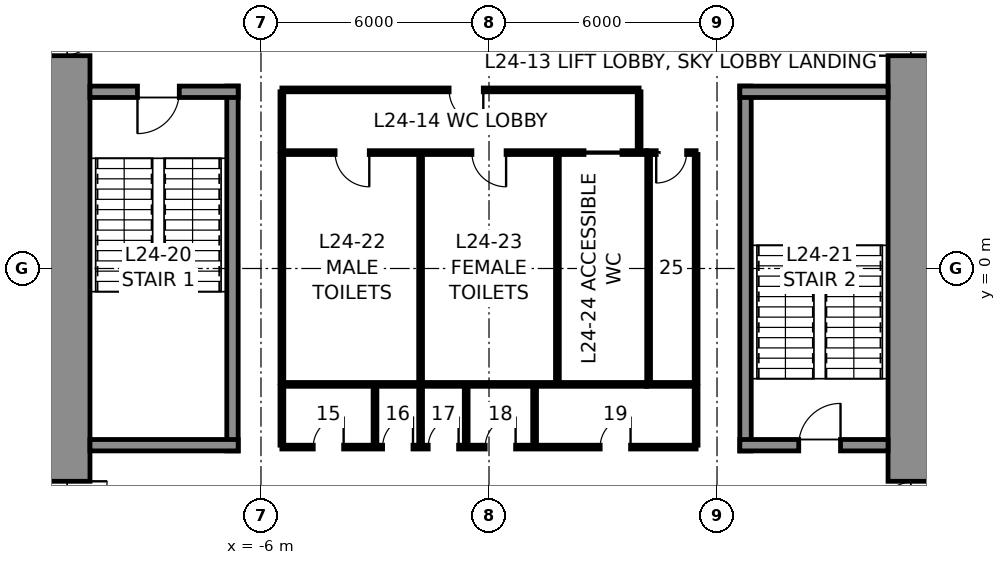
"""IFC4 building model, lengths in metres.
Left out: names, types, materials, properties, quantities, classifications, styles, units other than length and angle.
Written with IfcOpenShell. Run it as: python <this file> out.ifc"""

import sys

from ifc_helpers import new_model, si_unit, direction, frame, frame_2d, origin, place, context, subcontext, project, spatial, rectangle, extrude, element, fill, save


model = new_model("IFC4")
c1 = context("Model", 3, precision=1e-05, world=origin(), true_north=direction((0.0, 1.0)))
c2 = subcontext(c1, "Body", "Model", "MODEL_VIEW")
j1 = project(units=[si_unit("LENGTHUNIT", "METRE"), si_unit("PLANEANGLEUNIT", "RADIAN")], contexts=[c1])
p1 = place(None, origin())
s1 = spatial("IfcSite", under=j1, at=p1, CompositionType="ELEMENT")
p2 = place(p1, origin())
s2 = spatial("IfcBuilding", under=s1, at=p2, CompositionType="ELEMENT")
p3 = place(p2, frame((0.0, 0.0, 122.8)))
s3 = spatial("IfcBuildingStorey", under=s2, at=p3, CompositionType="ELEMENT", Elevation=122.8)
p4 = place(p3, frame((11.25, 10.5, 0.0), z_axis=(0.0, 0.0, 1.0), x_axis=(0.0, -1.0, 0.0)))
e1 = element("IfcWall", 1, at=p4, inside=s3, PredefinedType="SHEAR", context=c2, shape_type="SweptSolid", body=[
    extrude(rectangle(XDim=21.0, YDim=1.5, at=frame_2d((10.5, 0.0))), origin(), (0.0, 0.0, 1.0), 5.0),
])
p5 = place(p4, frame((3.7, 0.0, 0.0)))
e2 = element("IfcOpeningElement", 2, at=p5, cuts=e1, PredefinedType="OPENING", context=c2, shape_type="SweptSolid", body=[
    extrude(rectangle(XDim=1.2, YDim=2.3, at=frame_2d((0.6, 1.15))), frame((0.0, 0.76, 0.0), z_axis=(0.0, -1.0, 0.0), x_axis=(1.0, 0.0, 0.0)), (0.0, 0.0, 1.0), 1.52),
])
p6 = place(p4, frame((16.1, 0.0, 0.0)))
e3 = element("IfcOpeningElement", 3, at=p6, cuts=e1, PredefinedType="OPENING", context=c2, shape_type="SweptSolid", body=[
    extrude(rectangle(XDim=1.2, YDim=2.3, at=frame_2d((0.6, 1.15))), frame((0.0, 0.76, 0.0), z_axis=(0.0, -1.0, 0.0), x_axis=(1.0, 0.0, 0.0)), (0.0, 0.0, 1.0), 1.52),
])
p7 = place(p3, frame((-11.25, -10.5, 0.0), z_axis=(0.0, 0.0, 1.0), x_axis=(0.0, 1.0, 0.0)))
e4 = element("IfcWall", 4, at=p7, inside=s3, PredefinedType="SHEAR", context=c2, shape_type="SweptSolid", body=[
    extrude(rectangle(XDim=21.0, YDim=1.5, at=frame_2d((10.5, 0.0))), origin(), (0.0, 0.0, 1.0), 5.0),
])
p8 = place(p7, frame((16.1, 0.0, 0.0)))
e5 = element("IfcOpeningElement", 5, at=p8, cuts=e4, PredefinedType="OPENING", context=c2, shape_type="SweptSolid", body=[
    extrude(rectangle(XDim=1.2, YDim=2.3, at=frame_2d((0.6, 1.15))), frame((0.0, 0.76, 0.0), z_axis=(0.0, -1.0, 0.0), x_axis=(1.0, 0.0, 0.0)), (0.0, 0.0, 1.0), 1.52),
])
p9 = place(p7, frame((3.7, 0.0, 0.0)))
e6 = element("IfcOpeningElement", 6, at=p9, cuts=e4, PredefinedType="OPENING", context=c2, shape_type="SweptSolid", body=[
    extrude(rectangle(XDim=1.2, YDim=2.3, at=frame_2d((0.6, 1.15))), frame((0.0, 0.76, 0.0), z_axis=(0.0, -1.0, 0.0), x_axis=(1.0, 0.0, 0.0)), (0.0, 0.0, 1.0), 1.52),
])
p10 = place(p3, frame((-6.75, -4.8, 0.0), z_axis=(0.0, 0.0, 1.0), x_axis=(0.0, 1.0, 0.0)))
e7 = element("IfcWall", 7, at=p10, inside=s3, PredefinedType="SOLIDWALL", context=c2, shape_type="SweptSolid", body=[
    extrude(rectangle(XDim=9.6, YDim=0.3, at=frame_2d((4.8, 0.0))), origin(), (0.0, 0.0, 1.0), 4.75),
])
p11 = place(p3, frame((-10.5, 4.65, 0.0), z_axis=(0.0, 0.0, 1.0), x_axis=(1.0, 0.0, 0.0)))
e8 = element("IfcWall", 8, at=p11, inside=s3, PredefinedType="SOLIDWALL", context=c2, shape_type="SweptSolid", body=[
    extrude(rectangle(XDim=3.9, YDim=0.3, at=frame_2d((1.95, 0.0))), origin(), (0.0, 0.0, 1.0), 4.75),
])
p12 = place(p11, frame((1.25, 0.0, 0.0)))
e9 = element("IfcOpeningElement", 9, at=p12, cuts=e8, PredefinedType="OPENING", context=c2, shape_type="SweptSolid", body=[
    extrude(rectangle(XDim=1.1, YDim=2.3, at=frame_2d((0.55, 1.15))), frame((0.0, 0.16, 0.0), z_axis=(0.0, -1.0, 0.0), x_axis=(1.0, 0.0, 0.0)), (0.0, 0.0, 1.0), 0.32),
])
p13 = place(p3, frame((-6.6, -4.65, 0.0), z_axis=(0.0, 0.0, 1.0), x_axis=(-1.0, 0.0, 0.0)))
e10 = element("IfcWall", 10, at=p13, inside=s3, PredefinedType="SOLIDWALL", context=c2, shape_type="SweptSolid", body=[
    extrude(rectangle(XDim=3.9, YDim=0.3, at=frame_2d((1.95, 0.0))), origin(), (0.0, 0.0, 1.0), 4.75),
])
p14 = place(p3, frame((6.75, -4.8, 0.0), z_axis=(0.0, 0.0, 1.0), x_axis=(0.0, 1.0, 0.0)))
e11 = element("IfcWall", 11, at=p14, inside=s3, PredefinedType="SOLIDWALL", context=c2, shape_type="SweptSolid", body=[
    extrude(rectangle(XDim=9.6, YDim=0.3, at=frame_2d((4.8, 0.0))), origin(), (0.0, 0.0, 1.0), 4.75),
])
p15 = place(p3, frame((6.6, 4.65, 0.0), z_axis=(0.0, 0.0, 1.0), x_axis=(1.0, 0.0, 0.0)))
e12 = element("IfcWall", 12, at=p15, inside=s3, PredefinedType="SOLIDWALL", context=c2, shape_type="SweptSolid", body=[
    extrude(rectangle(XDim=3.9, YDim=0.3, at=frame_2d((1.95, 0.0))), origin(), (0.0, 0.0, 1.0), 4.75),
])
p16 = place(p3, frame((10.5, -4.65, 0.0), z_axis=(0.0, 0.0, 1.0), x_axis=(-1.0, 0.0, 0.0)))
e13 = element("IfcWall", 13, at=p16, inside=s3, PredefinedType="SOLIDWALL", context=c2, shape_type="SweptSolid", body=[
    extrude(rectangle(XDim=3.9, YDim=0.3, at=frame_2d((1.95, 0.0))), origin(), (0.0, 0.0, 1.0), 4.75),
])
p17 = place(p16, frame((1.25, 0.0, 0.0)))
e14 = element("IfcOpeningElement", 14, at=p17, cuts=e13, PredefinedType="OPENING", context=c2, shape_type="SweptSolid", body=[
    extrude(rectangle(XDim=1.1, YDim=2.3, at=frame_2d((0.55, 1.15))), frame((0.0, 0.16, 0.0), z_axis=(0.0, -1.0, 0.0), x_axis=(1.0, 0.0, 0.0)), (0.0, 0.0, 1.0), 0.32),
])
p18 = place(p3, frame((-5.45, 3.05, 0.0), z_axis=(0.0, 0.0, 1.0), x_axis=(1.0, 0.0, 0.0)))
e15 = element("IfcWall", 15, at=p18, inside=s3, PredefinedType="PARTITIONING", context=c2, shape_type="SweptSolid", body=[
    extrude(rectangle(XDim=9.6, YDim=0.1, at=frame_2d((4.8, 0.0))), origin(), (0.0, 0.0, 1.0), 4.75),
])
p19 = place(p18, frame((1.4, 0.0, 0.0)))
e16 = element("IfcOpeningElement", 16, at=p19, cuts=e15, PredefinedType="OPENING", context=c2, shape_type="SweptSolid", body=[
    extrude(rectangle(XDim=0.9, YDim=2.3, at=frame_2d((0.45, 1.15))), frame((0.0, 0.06, 0.0), z_axis=(0.0, -1.0, 0.0), x_axis=(1.0, 0.0, 0.0)), (0.0, 0.0, 1.0), 0.12),
])
p20 = place(p18, frame((5.0, 0.0, 0.0)))
e17 = element("IfcOpeningElement", 17, at=p20, cuts=e15, PredefinedType="OPENING", context=c2, shape_type="SweptSolid", body=[
    extrude(rectangle(XDim=0.9, YDim=2.3, at=frame_2d((0.45, 1.15))), frame((0.0, 0.06, 0.0), z_axis=(0.0, -1.0, 0.0), x_axis=(1.0, 0.0, 0.0)), (0.0, 0.0, 1.0), 0.12),
])
p21 = place(p18, frame((7.95, 0.0, 0.0)))
e18 = element("IfcOpeningElement", 18, at=p21, cuts=e15, PredefinedType="OPENING", context=c2, shape_type="SweptSolid", body=[
    extrude(rectangle(XDim=1.0, YDim=2.3, at=frame_2d((0.5, 1.15))), frame((0.0, 0.06, 0.0), z_axis=(0.0, -1.0, 0.0), x_axis=(1.0, 0.0, 0.0)), (0.0, 0.0, 1.0), 0.12),
])
p22 = place(p3, frame((4.15, 3.05, 0.0), z_axis=(0.0, 0.0, 1.0), x_axis=(1.0, 0.0, 0.0)))
e19 = element("IfcWall", 19, at=p22, inside=s3, PredefinedType="PARTITIONING", context=c2, shape_type="SweptSolid", body=[
    extrude(rectangle(XDim=1.3, YDim=0.1, at=frame_2d((0.65, 0.0))), origin(), (0.0, 0.0, 1.0), 4.75),
])
p23 = place(p22, frame((0.25, 0.0, 0.0)))
e20 = element("IfcOpeningElement", 20, at=p23, cuts=e19, PredefinedType="OPENING", context=c2, shape_type="SweptSolid", body=[
    extrude(rectangle(XDim=0.8, YDim=2.3, at=frame_2d((0.4, 1.15))), frame((0.0, 0.06, 0.0), z_axis=(0.0, -1.0, 0.0), x_axis=(1.0, 0.0, 0.0)), (0.0, 0.0, 1.0), 0.12),
])
p24 = place(p3, frame((4.15, -3.05, 0.0), z_axis=(0.0, 0.0, 1.0), x_axis=(-1.0, 0.0, 0.0)))
e21 = element("IfcWall", 21, at=p24, inside=s3, PredefinedType="PARTITIONING", context=c2, shape_type="SweptSolid", body=[
    extrude(rectangle(XDim=9.6, YDim=0.1, at=frame_2d((4.8, 0.0))), origin(), (0.0, 0.0, 1.0), 4.75),
])
p25 = place(p3, frame((5.45, -3.05, 0.0), z_axis=(0.0, 0.0, 1.0), x_axis=(-1.0, 0.0, 0.0)))
e22 = element("IfcWall", 22, at=p25, inside=s3, PredefinedType="PARTITIONING", context=c2, shape_type="SweptSolid", body=[
    extrude(rectangle(XDim=1.3, YDim=0.1, at=frame_2d((0.65, 0.0))), origin(), (0.0, 0.0, 1.0), 4.75),
])
for number, where, z_axis, x_axis in (
    (23, (5.45, 3.0, 0.0), (0.0, 0.0, 1.0), (0.0, -1.0, 0.0)),
    (24, (-5.45, -3.0, 0.0), (0.0, 0.0, 1.0), (0.0, 1.0, 0.0)),
    (25, (-1.8, -3.0, 0.0), (0.0, 0.0, 1.0), (0.0, 1.0, 0.0)),
    (26, (1.8, -3.0, 0.0), (0.0, 0.0, 1.0), (0.0, 1.0, 0.0)),
    (27, (4.2, -3.0, 0.0), (0.0, 0.0, 1.0), (0.0, 1.0, 0.0)),
):
    element("IfcWall", number, at=place(p3, frame(where, z_axis=z_axis, x_axis=x_axis)), inside=s3, PredefinedType="PARTITIONING", context=c2, shape_type="SweptSolid", body=[
        extrude(rectangle(XDim=6.0, YDim=0.1, at=frame_2d((3.0, 0.0))), origin(), (0.0, 0.0, 1.0), 4.75),
    ])
p26 = place(p3, frame((-5.45, 4.7, 0.0), z_axis=(0.0, 0.0, 1.0), x_axis=(1.0, 0.0, 0.0)))
e28 = element("IfcWall", 28, at=p26, inside=s3, PredefinedType="PARTITIONING", context=c2, shape_type="SweptSolid", body=[
    extrude(rectangle(XDim=9.4, YDim=0.1, at=frame_2d((4.7, 0.0))), origin(), (0.0, 0.0, 1.0), 4.75),
])
p27 = place(p26, frame((4.4, 0.0, 0.0)))
e29 = element("IfcOpeningElement", 29, at=p27, cuts=e28, PredefinedType="OPENING", context=c2, shape_type="SweptSolid", body=[
    extrude(rectangle(XDim=0.9, YDim=2.3, at=frame_2d((0.45, 1.15))), frame((0.0, 0.06, 0.0), z_axis=(0.0, -1.0, 0.0), x_axis=(1.0, 0.0, 0.0)), (0.0, 0.0, 1.0), 0.12),
])
for number, where, z_axis, x_axis in (
    (30, (-5.45, 3.1, 0.0), (0.0, 0.0, 1.0), (0.0, 1.0, 0.0)),
    (31, (3.95, 3.1, 0.0), (0.0, 0.0, 1.0), (0.0, 1.0, 0.0)),
):
    element("IfcWall", number, at=place(p3, frame(where, z_axis=z_axis, x_axis=x_axis)), inside=s3, PredefinedType="PARTITIONING", context=c2, shape_type="SweptSolid", body=[
        extrude(rectangle(XDim=1.55, YDim=0.1, at=frame_2d((0.775, 0.0))), origin(), (0.0, 0.0, 1.0), 4.75),
    ])
p28 = place(p3, frame((5.45, -4.7, 0.0), z_axis=(0.0, 0.0, 1.0), x_axis=(-1.0, 0.0, 0.0)))
e32 = element("IfcWall", 32, at=p28, inside=s3, PredefinedType="PARTITIONING", context=c2, shape_type="SweptSolid", body=[
    extrude(rectangle(XDim=10.9, YDim=0.1, at=frame_2d((5.45, 0.0))), origin(), (0.0, 0.0, 1.0), 4.75),
])
p29 = place(p28, frame((9.275, 0.0, 0.0)))
e33 = element("IfcOpeningElement", 33, at=p29, cuts=e32, PredefinedType="OPENING", context=c2, shape_type="SweptSolid", body=[
    extrude(rectangle(XDim=0.8, YDim=2.3, at=frame_2d((0.4, 1.15))), frame((0.0, 0.06, 0.0), z_axis=(0.0, -1.0, 0.0), x_axis=(1.0, 0.0, 0.0)), (0.0, 0.0, 1.0), 0.12),
])
p30 = place(p28, frame((7.45, 0.0, 0.0)))
e34 = element("IfcOpeningElement", 34, at=p30, cuts=e32, PredefinedType="OPENING", context=c2, shape_type="SweptSolid", body=[
    extrude(rectangle(XDim=0.8, YDim=2.3, at=frame_2d((0.4, 1.15))), frame((0.0, 0.06, 0.0), z_axis=(0.0, -1.0, 0.0), x_axis=(1.0, 0.0, 0.0)), (0.0, 0.0, 1.0), 0.12),
])
p31 = place(p28, frame((6.25, 0.0, 0.0)))
e35 = element("IfcOpeningElement", 35, at=p31, cuts=e32, PredefinedType="OPENING", context=c2, shape_type="SweptSolid", body=[
    extrude(rectangle(XDim=0.8, YDim=2.3, at=frame_2d((0.4, 1.15))), frame((0.0, 0.06, 0.0), z_axis=(0.0, -1.0, 0.0), x_axis=(1.0, 0.0, 0.0)), (0.0, 0.0, 1.0), 0.12),
])
p32 = place(p28, frame((4.75, 0.0, 0.0)))
e36 = element("IfcOpeningElement", 36, at=p32, cuts=e32, PredefinedType="OPENING", context=c2, shape_type="SweptSolid", body=[
    extrude(rectangle(XDim=0.8, YDim=2.3, at=frame_2d((0.4, 1.15))), frame((0.0, 0.06, 0.0), z_axis=(0.0, -1.0, 0.0), x_axis=(1.0, 0.0, 0.0)), (0.0, 0.0, 1.0), 0.12),
])
p33 = place(p28, frame((1.725, 0.0, 0.0)))
e37 = element("IfcOpeningElement", 37, at=p33, cuts=e32, PredefinedType="OPENING", context=c2, shape_type="SweptSolid", body=[
    extrude(rectangle(XDim=0.8, YDim=2.3, at=frame_2d((0.4, 1.15))), frame((0.0, 0.06, 0.0), z_axis=(0.0, -1.0, 0.0), x_axis=(1.0, 0.0, 0.0)), (0.0, 0.0, 1.0), 0.12),
])
for number, where, z_axis, x_axis in (
    (38, (-5.45, -3.1, 0.0), (0.0, 0.0, 1.0), (0.0, -1.0, 0.0)),
    (39, (5.45, -3.1, 0.0), (0.0, 0.0, 1.0), (0.0, -1.0, 0.0)),
    (40, (-3.0, -3.1, 0.0), (0.0, 0.0, 1.0), (0.0, -1.0, 0.0)),
    (41, (-1.8, -3.1, 0.0), (0.0, 0.0, 1.0), (0.0, -1.0, 0.0)),
    (42, (-0.6, -3.1, 0.0), (0.0, 0.0, 1.0), (0.0, -1.0, 0.0)),
    (43, (1.2, -3.1, 0.0), (0.0, 0.0, 1.0), (0.0, -1.0, 0.0)),
):
    element("IfcWall", number, at=place(p3, frame(where, z_axis=z_axis, x_axis=x_axis)), inside=s3, PredefinedType="PARTITIONING", context=c2, shape_type="SweptSolid", body=[
        extrude(rectangle(XDim=1.55, YDim=0.1, at=frame_2d((0.775, 0.0))), origin(), (0.0, 0.0, 1.0), 4.75),
    ])
p34 = place(p12, frame((1.1, 0.0, 0.0), z_axis=(0.0, 0.0, 1.0), x_axis=(-1.0, 0.0, 0.0)))
e44 = element("IfcDoor", 44, at=p34, inside=s3, OperationType="SINGLE_SWING_RIGHT", PredefinedType="DOOR", context=c2, shape_type="SweptSolid", body=[
    extrude(rectangle(XDim=1.1, YDim=2.3, at=frame_2d((0.55, 1.15))), frame((0.0, 0.025, 0.0), z_axis=(0.0, -1.0, 0.0), x_axis=(1.0, 0.0, 0.0)), (0.0, 0.0, 1.0), 0.05),
])
fill(e9, e44)
p35 = place(p17, frame((1.1, 0.0, 0.0), z_axis=(0.0, 0.0, 1.0), x_axis=(-1.0, 0.0, 0.0)))
e45 = element("IfcDoor", 45, at=p35, inside=s3, OperationType="SINGLE_SWING_RIGHT", PredefinedType="DOOR", context=c2, shape_type="SweptSolid", body=[
    extrude(rectangle(XDim=1.1, YDim=2.3, at=frame_2d((0.55, 1.15))), frame((0.0, 0.025, 0.0), z_axis=(0.0, -1.0, 0.0), x_axis=(1.0, 0.0, 0.0)), (0.0, 0.0, 1.0), 0.05),
])
fill(e14, e45)
p36 = place(p19, frame((0.9, 0.0, 0.0), z_axis=(0.0, 0.0, 1.0), x_axis=(-1.0, 0.0, 0.0)))
e46 = element("IfcDoor", 46, at=p36, inside=s3, OperationType="SINGLE_SWING_LEFT", PredefinedType="DOOR", context=c2, shape_type="SweptSolid", body=[
    extrude(rectangle(XDim=0.9, YDim=2.3, at=frame_2d((0.45, 1.15))), frame((0.0, 0.025, 0.0), z_axis=(0.0, -1.0, 0.0), x_axis=(1.0, 0.0, 0.0)), (0.0, 0.0, 1.0), 0.05),
])
fill(e16, e46)
p37 = place(p20, frame((0.9, 0.0, 0.0), z_axis=(0.0, 0.0, 1.0), x_axis=(-1.0, 0.0, 0.0)))
e47 = element("IfcDoor", 47, at=p37, inside=s3, OperationType="SINGLE_SWING_LEFT", PredefinedType="DOOR", context=c2, shape_type="SweptSolid", body=[
    extrude(rectangle(XDim=0.9, YDim=2.3, at=frame_2d((0.45, 1.15))), frame((0.0, 0.025, 0.0), z_axis=(0.0, -1.0, 0.0), x_axis=(1.0, 0.0, 0.0)), (0.0, 0.0, 1.0), 0.05),
])
fill(e17, e47)
p38 = place(p21, frame((1.0, 0.0, 0.0), z_axis=(0.0, 0.0, 1.0), x_axis=(-1.0, 0.0, 0.0)))
e48 = element("IfcDoor", 48, at=p38, inside=s3, OperationType="SLIDING_TO_LEFT", PredefinedType="DOOR", context=c2, shape_type="SweptSolid", body=[
    extrude(rectangle(XDim=1.0, YDim=2.3, at=frame_2d((0.5, 1.15))), frame((0.0, 0.025, 0.0), z_axis=(0.0, -1.0, 0.0), x_axis=(1.0, 0.0, 0.0)), (0.0, 0.0, 1.0), 0.05),
])
fill(e18, e48)
p39 = place(p23, frame((0.8, 0.0, 0.0), z_axis=(0.0, 0.0, 1.0), x_axis=(-1.0, 0.0, 0.0)))
e49 = element("IfcDoor", 49, at=p39, inside=s3, OperationType="SINGLE_SWING_RIGHT", PredefinedType="DOOR", context=c2, shape_type="SweptSolid", body=[
    extrude(rectangle(XDim=0.8, YDim=2.3, at=frame_2d((0.4, 1.15))), frame((0.0, 0.025, 0.0), z_axis=(0.0, -1.0, 0.0), x_axis=(1.0, 0.0, 0.0)), (0.0, 0.0, 1.0), 0.05),
])
fill(e20, e49)
p40 = place(p27, frame((0.9, 0.0, 0.0), z_axis=(0.0, 0.0, 1.0), x_axis=(-1.0, 0.0, 0.0)))
e50 = element("IfcDoor", 50, at=p40, inside=s3, OperationType="SINGLE_SWING_LEFT", PredefinedType="DOOR", context=c2, shape_type="SweptSolid", body=[
    extrude(rectangle(XDim=0.9, YDim=2.3, at=frame_2d((0.45, 1.15))), frame((0.0, 0.025, 0.0), z_axis=(0.0, -1.0, 0.0), x_axis=(1.0, 0.0, 0.0)), (0.0, 0.0, 1.0), 0.05),
])
fill(e29, e50)
p41 = place(p29, frame((0.8, 0.0, 0.0), z_axis=(0.0, 0.0, 1.0), x_axis=(-1.0, 0.0, 0.0)))
e51 = element("IfcDoor", 51, at=p41, inside=s3, OperationType="SINGLE_SWING_RIGHT", PredefinedType="DOOR", context=c2, shape_type="SweptSolid", body=[
    extrude(rectangle(XDim=0.8, YDim=2.3, at=frame_2d((0.4, 1.15))), frame((0.0, 0.025, 0.0), z_axis=(0.0, -1.0, 0.0), x_axis=(1.0, 0.0, 0.0)), (0.0, 0.0, 1.0), 0.05),
])
fill(e33, e51)
p42 = place(p30, frame((0.8, 0.0, 0.0), z_axis=(0.0, 0.0, 1.0), x_axis=(-1.0, 0.0, 0.0)))
e52 = element("IfcDoor", 52, at=p42, inside=s3, OperationType="SINGLE_SWING_RIGHT", PredefinedType="DOOR", context=c2, shape_type="SweptSolid", body=[
    extrude(rectangle(XDim=0.8, YDim=2.3, at=frame_2d((0.4, 1.15))), frame((0.0, 0.025, 0.0), z_axis=(0.0, -1.0, 0.0), x_axis=(1.0, 0.0, 0.0)), (0.0, 0.0, 1.0), 0.05),
])
fill(e34, e52)
p43 = place(p31, frame((0.8, 0.0, 0.0), z_axis=(0.0, 0.0, 1.0), x_axis=(-1.0, 0.0, 0.0)))
e53 = element("IfcDoor", 53, at=p43, inside=s3, OperationType="SINGLE_SWING_RIGHT", PredefinedType="DOOR", context=c2, shape_type="SweptSolid", body=[
    extrude(rectangle(XDim=0.8, YDim=2.3, at=frame_2d((0.4, 1.15))), frame((0.0, 0.025, 0.0), z_axis=(0.0, -1.0, 0.0), x_axis=(1.0, 0.0, 0.0)), (0.0, 0.0, 1.0), 0.05),
])
fill(e35, e53)
p44 = place(p32, frame((0.8, 0.0, 0.0), z_axis=(0.0, 0.0, 1.0), x_axis=(-1.0, 0.0, 0.0)))
e54 = element("IfcDoor", 54, at=p44, inside=s3, OperationType="SINGLE_SWING_RIGHT", PredefinedType="DOOR", context=c2, shape_type="SweptSolid", body=[
    extrude(rectangle(XDim=0.8, YDim=2.3, at=frame_2d((0.4, 1.15))), frame((0.0, 0.025, 0.0), z_axis=(0.0, -1.0, 0.0), x_axis=(1.0, 0.0, 0.0)), (0.0, 0.0, 1.0), 0.05),
])
fill(e36, e54)
p45 = place(p33, frame((0.8, 0.0, 0.0), z_axis=(0.0, 0.0, 1.0), x_axis=(-1.0, 0.0, 0.0)))
e55 = element("IfcDoor", 55, at=p45, inside=s3, OperationType="SINGLE_SWING_RIGHT", PredefinedType="DOOR", context=c2, shape_type="SweptSolid", body=[
    extrude(rectangle(XDim=0.8, YDim=2.3, at=frame_2d((0.4, 1.15))), frame((0.0, 0.025, 0.0), z_axis=(0.0, -1.0, 0.0), x_axis=(1.0, 0.0, 0.0)), (0.0, 0.0, 1.0), 0.05),
])
fill(e37, e55)
p46 = place(p8, frame((1.2, 0.0, 0.0), z_axis=(0.0, 0.0, 1.0), x_axis=(-1.0, 0.0, 0.0)))
e56 = element("IfcDoor", 56, at=p46, inside=s3, OperationType="SINGLE_SWING_LEFT", PredefinedType="DOOR", context=c2, shape_type="SweptSolid", body=[
    extrude(rectangle(XDim=1.2, YDim=2.3, at=frame_2d((0.6, 1.15))), frame((0.0, 0.025, 0.0), z_axis=(0.0, -1.0, 0.0), x_axis=(1.0, 0.0, 0.0)), (0.0, 0.0, 1.0), 0.05),
])
fill(e5, e56)
p47 = place(p9, frame((1.2, 0.0, 0.0), z_axis=(0.0, 0.0, 1.0), x_axis=(-1.0, 0.0, 0.0)))
e57 = element("IfcDoor", 57, at=p47, inside=s3, OperationType="SINGLE_SWING_LEFT", PredefinedType="DOOR", context=c2, shape_type="SweptSolid", body=[
    extrude(rectangle(XDim=1.2, YDim=2.3, at=frame_2d((0.6, 1.15))), frame((0.0, 0.025, 0.0), z_axis=(0.0, -1.0, 0.0), x_axis=(1.0, 0.0, 0.0)), (0.0, 0.0, 1.0), 0.05),
])
fill(e6, e57)
p48 = place(p5, frame((1.2, 0.0, 0.0), z_axis=(0.0, 0.0, 1.0), x_axis=(-1.0, 0.0, 0.0)))
e58 = element("IfcDoor", 58, at=p48, inside=s3, OperationType="SINGLE_SWING_LEFT", PredefinedType="DOOR", context=c2, shape_type="SweptSolid", body=[
    extrude(rectangle(XDim=1.2, YDim=2.3, at=frame_2d((0.6, 1.15))), frame((0.0, 0.025, 0.0), z_axis=(0.0, -1.0, 0.0), x_axis=(1.0, 0.0, 0.0)), (0.0, 0.0, 1.0), 0.05),
])
fill(e2, e58)
p49 = place(p6, frame((1.2, 0.0, 0.0), z_axis=(0.0, 0.0, 1.0), x_axis=(-1.0, 0.0, 0.0)))
e59 = element("IfcDoor", 59, at=p49, inside=s3, OperationType="SINGLE_SWING_LEFT", PredefinedType="DOOR", context=c2, shape_type="SweptSolid", body=[
    extrude(rectangle(XDim=1.2, YDim=2.3, at=frame_2d((0.6, 1.15))), frame((0.0, 0.025, 0.0), z_axis=(0.0, -1.0, 0.0), x_axis=(1.0, 0.0, 0.0)), (0.0, 0.0, 1.0), 0.05),
])
fill(e3, e59)
save(model, sys.argv[1])
